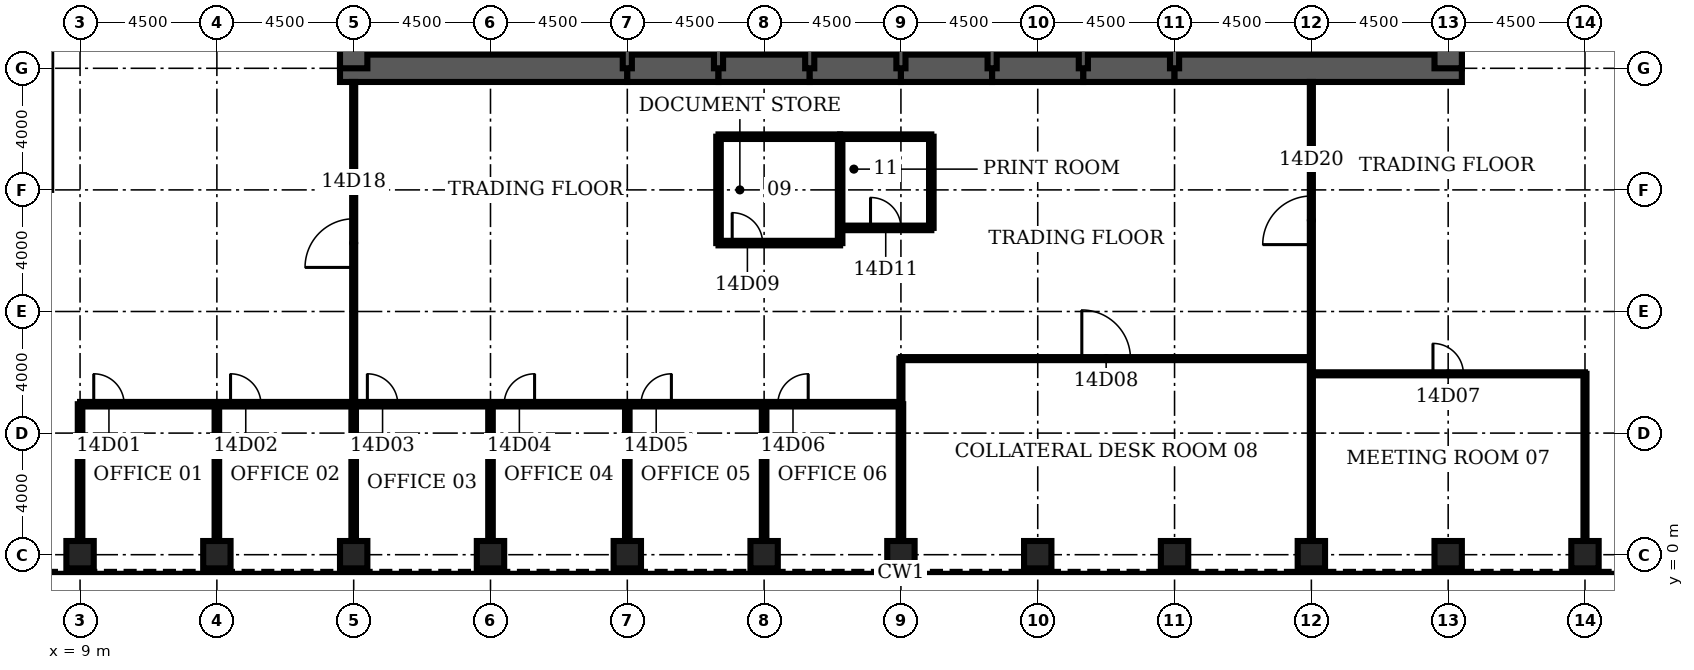
"""IFC4 building model, lengths in metres.
Left out: names, types, materials, properties, quantities, classifications, styles, units other than length and angle.
Written with IfcOpenShell. Run it as: python <this file> out.ifc"""

import sys

from ifc_helpers import new_model, si_unit, direction, frame, frame_2d, origin, origin_2d, place, context, subcontext, project, spatial, rectangle, hollow_rectangle, extrude, element, fill, save


model = new_model("IFC4")
c1 = context("Model", 3, precision=1e-05, world=origin(), true_north=direction((0.0, 1.0)))
c2 = subcontext(c1, "Body", "Model", "MODEL_VIEW")
j1 = project(units=[si_unit("LENGTHUNIT", "METRE"), si_unit("PLANEANGLEUNIT", "RADIAN")], contexts=[c1])
p1 = place(None, origin())
s1 = spatial("IfcSite", under=j1, at=p1, CompositionType="ELEMENT")
p2 = place(p1, origin())
s2 = spatial("IfcBuilding", under=s1, at=p2, CompositionType="ELEMENT")
p3 = place(p2, frame((0.0, 0.0, 68.0)))
s3 = spatial("IfcBuildingStorey", under=s2, at=p3, CompositionType="ELEMENT", Elevation=68.0)
for number, where, z_axis, x_axis in (
    (1, (9.0, 0.0, 0.0), (0.0, 0.0, 1.0), (0.0, 1.0, 0.0)),
    (2, (13.5, 0.0, 0.0), (0.0, 0.0, 1.0), (0.0, 1.0, 0.0)),
    (3, (18.0, 0.0, 0.0), (0.0, 0.0, 1.0), (0.0, 1.0, 0.0)),
    (4, (22.5, 0.0, 0.0), (0.0, 0.0, 1.0), (0.0, 1.0, 0.0)),
    (5, (27.0, 0.0, 0.0), (0.0, 0.0, 1.0), (0.0, 1.0, 0.0)),
    (6, (31.5, 0.0, 0.0), (0.0, 0.0, 1.0), (0.0, 1.0, 0.0)),
    (7, (36.0, 0.0, 0.0), (0.0, 0.0, 1.0), (0.0, 1.0, 0.0)),
    (8, (40.5, 0.0, 0.0), (0.0, 0.0, 1.0), (0.0, 1.0, 0.0)),
    (9, (45.0, 0.0, 0.0), (0.0, 0.0, 1.0), (0.0, 1.0, 0.0)),
    (10, (49.5, 0.0, 0.0), (0.0, 0.0, 1.0), (0.0, 1.0, 0.0)),
    (11, (54.0, 0.0, 0.0), (0.0, 0.0, 1.0), (0.0, 1.0, 0.0)),
    (12, (58.5, 0.0, 0.0), (0.0, 0.0, 1.0), (0.0, 1.0, 0.0)),
):
    element("IfcColumn", number, at=place(p3, frame(where, z_axis=z_axis, x_axis=x_axis)), inside=s3, PredefinedType="COLUMN", context=c2, shape_type="SweptSolid", body=[
        extrude(hollow_rectangle(XDim=0.9, YDim=0.9, WallThickness=0.12, at=origin_2d()), origin(), (0.0, 0.0, 1.0), 4.5),
    ])
p4 = place(p3, frame((17.55, 16.0, 0.0), z_axis=(0.0, 0.0, 1.0), x_axis=(1.0, 0.0, 0.0)))
e13 = element("IfcWall", 13, at=p4, inside=s3, PredefinedType="SHEAR", context=c2, shape_type="SweptSolid", body=[
    extrude(rectangle(XDim=9.45, YDim=0.9, at=frame_2d((4.725, 0.0))), origin(), (0.0, 0.0, 1.0), 4.5),
])
for number, where, z_axis, x_axis in (
    (14, (27.0, 16.0, 0.0), (0.0, 0.0, 1.0), (1.0, 0.0, 0.0)),
    (15, (30.0, 16.0, 0.0), (0.0, 0.0, 1.0), (1.0, 0.0, 0.0)),
    (16, (33.0, 16.0, 0.0), (0.0, 0.0, 1.0), (1.0, 0.0, 0.0)),
    (17, (36.0, 16.0, 0.0), (0.0, 0.0, 1.0), (1.0, 0.0, 0.0)),
    (18, (39.0, 16.0, 0.0), (0.0, 0.0, 1.0), (1.0, 0.0, 0.0)),
    (19, (42.0, 16.0, 0.0), (0.0, 0.0, 1.0), (1.0, 0.0, 0.0)),
):
    element("IfcWall", number, at=place(p3, frame(where, z_axis=z_axis, x_axis=x_axis)), inside=s3, PredefinedType="SHEAR", context=c2, shape_type="SweptSolid", body=[
        extrude(rectangle(XDim=3.0, YDim=0.9, at=frame_2d((1.5, 0.0))), origin(), (0.0, 0.0, 1.0), 4.5),
    ])
p5 = place(p3, frame((45.0, 16.0, 0.0), z_axis=(0.0, 0.0, 1.0), x_axis=(1.0, 0.0, 0.0)))
e20 = element("IfcWall", 20, at=p5, inside=s3, PredefinedType="SHEAR", context=c2, shape_type="SweptSolid", body=[
    extrude(rectangle(XDim=9.45, YDim=0.9, at=frame_2d((4.725, 0.0))), origin(), (0.0, 0.0, 1.0), 4.5),
])
for number, where, z_axis, x_axis in (
    (21, (18.0, 19.2, 0.0), (0.0, 0.0, 1.0), (0.0, -1.0, 0.0)),
    (22, (54.0, 16.0, 0.0), (0.0, 0.0, 1.0), (0.0, 1.0, 0.0)),
):
    element("IfcWall", number, at=place(p3, frame(where, z_axis=z_axis, x_axis=x_axis)), inside=s3, PredefinedType="SHEAR", context=c2, shape_type="SweptSolid", body=[
        extrude(rectangle(XDim=3.2, YDim=0.9, at=frame_2d((1.6, 0.0))), origin(), (0.0, 0.0, 1.0), 4.5),
    ])
for number, where, z_axis, x_axis in (
    (23, (27.0, 16.0, 0.0), (0.0, 0.0, 1.0), (0.0, 1.0, 0.0)),
    (24, (30.0, 16.0, 0.0), (0.0, 0.0, 1.0), (0.0, 1.0, 0.0)),
    (25, (33.0, 16.0, 0.0), (0.0, 0.0, 1.0), (0.0, 1.0, 0.0)),
    (26, (36.0, 16.0, 0.0), (0.0, 0.0, 1.0), (0.0, 1.0, 0.0)),
    (27, (39.0, 16.0, 0.0), (0.0, 0.0, 1.0), (0.0, 1.0, 0.0)),
    (28, (42.0, 16.0, 0.0), (0.0, 0.0, 1.0), (0.0, 1.0, 0.0)),
    (29, (45.0, 16.0, 0.0), (0.0, 0.0, 1.0), (0.0, 1.0, 0.0)),
):
    element("IfcWall", number, at=place(p3, frame(where, z_axis=z_axis, x_axis=x_axis)), inside=s3, PredefinedType="SOLIDWALL", context=c2, shape_type="SweptSolid", body=[
        extrude(rectangle(XDim=3.2, YDim=0.3, at=frame_2d((1.6, 0.0))), origin(), (0.0, 0.0, 1.0), 4.5),
    ])
p6 = place(p3, frame((9.0, 4.95, 0.0), z_axis=(0.0, 0.0, 1.0), x_axis=(1.0, 0.0, 0.0)))
e30 = element("IfcWall", 30, at=p6, inside=s3, PredefinedType="PARTITIONING", context=c2, shape_type="SweptSolid", body=[
    extrude(rectangle(XDim=27.0, YDim=0.15, at=frame_2d((13.5, 0.0))), origin(), (0.0, 0.0, 1.0), 3.0),
])
p7 = place(p6, frame((0.45, 0.0, 0.0)))
e31 = element("IfcOpeningElement", 31, at=p7, cuts=e30, PredefinedType="OPENING", context=c2, shape_type="SweptSolid", body=[
    extrude(rectangle(XDim=1.0, YDim=2.1, at=frame_2d((0.5, 1.05))), frame((0.0, 0.085, 0.0), z_axis=(0.0, -1.0, 0.0), x_axis=(1.0, 0.0, 0.0)), (0.0, 0.0, 1.0), 0.17),
])
p8 = place(p6, frame((4.95, 0.0, 0.0)))
e32 = element("IfcOpeningElement", 32, at=p8, cuts=e30, PredefinedType="OPENING", context=c2, shape_type="SweptSolid", body=[
    extrude(rectangle(XDim=1.0, YDim=2.1, at=frame_2d((0.5, 1.05))), frame((0.0, 0.085, 0.0), z_axis=(0.0, -1.0, 0.0), x_axis=(1.0, 0.0, 0.0)), (0.0, 0.0, 1.0), 0.17),
])
p9 = place(p6, frame((9.45, 0.0, 0.0)))
e33 = element("IfcOpeningElement", 33, at=p9, cuts=e30, PredefinedType="OPENING", context=c2, shape_type="SweptSolid", body=[
    extrude(rectangle(XDim=1.0, YDim=2.1, at=frame_2d((0.5, 1.05))), frame((0.0, 0.085, 0.0), z_axis=(0.0, -1.0, 0.0), x_axis=(1.0, 0.0, 0.0)), (0.0, 0.0, 1.0), 0.17),
])
p10 = place(p6, frame((13.95, 0.0, 0.0)))
e34 = element("IfcOpeningElement", 34, at=p10, cuts=e30, PredefinedType="OPENING", context=c2, shape_type="SweptSolid", body=[
    extrude(rectangle(XDim=1.0, YDim=2.1, at=frame_2d((0.5, 1.05))), frame((0.0, 0.085, 0.0), z_axis=(0.0, -1.0, 0.0), x_axis=(1.0, 0.0, 0.0)), (0.0, 0.0, 1.0), 0.17),
])
p11 = place(p6, frame((18.45, 0.0, 0.0)))
e35 = element("IfcOpeningElement", 35, at=p11, cuts=e30, PredefinedType="OPENING", context=c2, shape_type="SweptSolid", body=[
    extrude(rectangle(XDim=1.0, YDim=2.1, at=frame_2d((0.5, 1.05))), frame((0.0, 0.085, 0.0), z_axis=(0.0, -1.0, 0.0), x_axis=(1.0, 0.0, 0.0)), (0.0, 0.0, 1.0), 0.17),
])
p12 = place(p6, frame((22.95, 0.0, 0.0)))
e36 = element("IfcOpeningElement", 36, at=p12, cuts=e30, PredefinedType="OPENING", context=c2, shape_type="SweptSolid", body=[
    extrude(rectangle(XDim=1.0, YDim=2.1, at=frame_2d((0.5, 1.05))), frame((0.0, 0.085, 0.0), z_axis=(0.0, -1.0, 0.0), x_axis=(1.0, 0.0, 0.0)), (0.0, 0.0, 1.0), 0.17),
])
p13 = place(p3, frame((49.5, 5.95, 0.0), z_axis=(0.0, 0.0, 1.0), x_axis=(1.0, 0.0, 0.0)))
e37 = element("IfcWall", 37, at=p13, inside=s3, PredefinedType="PARTITIONING", context=c2, shape_type="SweptSolid", body=[
    extrude(rectangle(XDim=9.0, YDim=0.1, at=frame_2d((4.5, 0.0))), origin(), (0.0, 0.0, 1.0), 3.0),
])
p14 = place(p13, frame((4.0, 0.0, 0.0)))
e38 = element("IfcOpeningElement", 38, at=p14, cuts=e37, PredefinedType="OPENING", context=c2, shape_type="SweptSolid", body=[
    extrude(rectangle(XDim=1.0, YDim=2.1, at=frame_2d((0.5, 1.05))), frame((0.0, 0.06, 0.0), z_axis=(0.0, -1.0, 0.0), x_axis=(1.0, 0.0, 0.0)), (0.0, 0.0, 1.0), 0.12),
])
p15 = place(p3, frame((36.0, 6.45, 0.0), z_axis=(0.0, 0.0, 1.0), x_axis=(1.0, 0.0, 0.0)))
e39 = element("IfcWall", 39, at=p15, inside=s3, PredefinedType="PARTITIONING", context=c2, shape_type="SweptSolid", body=[
    extrude(rectangle(XDim=13.5, YDim=0.1, at=frame_2d((6.75, 0.0))), origin(), (0.0, 0.0, 1.0), 3.0),
])
p16 = place(p15, frame((5.95, 0.0, 0.0)))
e40 = element("IfcOpeningElement", 40, at=p16, cuts=e39, PredefinedType="OPENING", context=c2, shape_type="SweptSolid", body=[
    extrude(rectangle(XDim=1.6, YDim=2.1, at=frame_2d((0.8, 1.05))), frame((0.0, 0.06, 0.0), z_axis=(0.0, -1.0, 0.0), x_axis=(1.0, 0.0, 0.0)), (0.0, 0.0, 1.0), 0.12),
])
p17 = place(p3, frame((30.0, 10.25, 0.0), z_axis=(0.0, 0.0, 1.0), x_axis=(1.0, 0.0, 0.0)))
e41 = element("IfcWall", 41, at=p17, inside=s3, PredefinedType="PARTITIONING", context=c2, shape_type="SweptSolid", body=[
    extrude(rectangle(XDim=4.0, YDim=0.15, at=frame_2d((2.0, 0.0))), origin(), (0.0, 0.0, 1.0), 3.0),
])
p18 = place(p17, frame((0.45, 0.0, 0.0)))
e42 = element("IfcOpeningElement", 42, at=p18, cuts=e41, PredefinedType="OPENING", context=c2, shape_type="SweptSolid", body=[
    extrude(rectangle(XDim=1.0, YDim=2.1, at=frame_2d((0.5, 1.05))), frame((0.0, 0.085, 0.0), z_axis=(0.0, -1.0, 0.0), x_axis=(1.0, 0.0, 0.0)), (0.0, 0.0, 1.0), 0.17),
])
p19 = place(p3, frame((34.0, 10.75, 0.0), z_axis=(0.0, 0.0, 1.0), x_axis=(1.0, 0.0, 0.0)))
e43 = element("IfcWall", 43, at=p19, inside=s3, PredefinedType="PARTITIONING", context=c2, shape_type="SweptSolid", body=[
    extrude(rectangle(XDim=3.0, YDim=0.15, at=frame_2d((1.5, 0.0))), origin(), (0.0, 0.0, 1.0), 3.0),
])
p20 = place(p19, frame((1.0, 0.0, 0.0)))
e44 = element("IfcOpeningElement", 44, at=p20, cuts=e43, PredefinedType="OPENING", context=c2, shape_type="SweptSolid", body=[
    extrude(rectangle(XDim=1.0, YDim=2.1, at=frame_2d((0.5, 1.05))), frame((0.0, 0.085, 0.0), z_axis=(0.0, -1.0, 0.0), x_axis=(1.0, 0.0, 0.0)), (0.0, 0.0, 1.0), 0.17),
])
p21 = place(p3, frame((30.0, 13.75, 0.0), z_axis=(0.0, 0.0, 1.0), x_axis=(1.0, 0.0, 0.0)))
e45 = element("IfcWall", 45, at=p21, inside=s3, PredefinedType="PARTITIONING", context=c2, shape_type="SweptSolid", body=[
    extrude(rectangle(XDim=4.0, YDim=0.15, at=frame_2d((2.0, 0.0))), origin(), (0.0, 0.0, 1.0), 3.0),
])
p22 = place(p3, frame((34.0, 13.75, 0.0), z_axis=(0.0, 0.0, 1.0), x_axis=(1.0, 0.0, 0.0)))
e46 = element("IfcWall", 46, at=p22, inside=s3, PredefinedType="PARTITIONING", context=c2, shape_type="SweptSolid", body=[
    extrude(rectangle(XDim=3.0, YDim=0.15, at=frame_2d((1.5, 0.0))), origin(), (0.0, 0.0, 1.0), 3.0),
])
for number, where, z_axis, x_axis in (
    (47, (9.0, 0.45, 0.0), (0.0, 0.0, 1.0), (0.0, 1.0, 0.0)),
    (48, (13.5, 0.45, 0.0), (0.0, 0.0, 1.0), (0.0, 1.0, 0.0)),
    (49, (18.0, 0.45, 0.0), (0.0, 0.0, 1.0), (0.0, 1.0, 0.0)),
):
    element("IfcWall", number, at=place(p3, frame(where, z_axis=z_axis, x_axis=x_axis)), inside=s3, PredefinedType="PARTITIONING", context=c2, shape_type="SweptSolid", body=[
        extrude(rectangle(XDim=4.5, YDim=0.15, at=frame_2d((2.25, 0.0))), origin(), (0.0, 0.0, 1.0), 3.0),
    ])
p23 = place(p3, frame((18.0, 4.95, 0.0), z_axis=(0.0, 0.0, 1.0), x_axis=(0.0, 1.0, 0.0)))
e50 = element("IfcWall", 50, at=p23, inside=s3, PredefinedType="PARTITIONING", context=c2, shape_type="SweptSolid", body=[
    extrude(rectangle(XDim=10.6, YDim=0.1, at=frame_2d((5.3, 0.0))), origin(), (0.0, 0.0, 1.0), 3.0),
])
p24 = place(p23, frame((4.5, 0.0, 0.0)))
e51 = element("IfcOpeningElement", 51, at=p24, cuts=e50, PredefinedType="OPENING", context=c2, shape_type="SweptSolid", body=[
    extrude(rectangle(XDim=1.6, YDim=2.1, at=frame_2d((0.8, 1.05))), frame((0.0, 0.06, 0.0), z_axis=(0.0, -1.0, 0.0), x_axis=(1.0, 0.0, 0.0)), (0.0, 0.0, 1.0), 0.12),
])
for number, where, z_axis, x_axis in (
    (52, (22.5, 0.45, 0.0), (0.0, 0.0, 1.0), (0.0, 1.0, 0.0)),
    (53, (27.0, 0.45, 0.0), (0.0, 0.0, 1.0), (0.0, 1.0, 0.0)),
):
    element("IfcWall", number, at=place(p3, frame(where, z_axis=z_axis, x_axis=x_axis)), inside=s3, PredefinedType="PARTITIONING", context=c2, shape_type="SweptSolid", body=[
        extrude(rectangle(XDim=4.5, YDim=0.15, at=frame_2d((2.25, 0.0))), origin(), (0.0, 0.0, 1.0), 3.0),
    ])
p25 = place(p3, frame((30.0, 10.25, 0.0), z_axis=(0.0, 0.0, 1.0), x_axis=(0.0, 1.0, 0.0)))
e54 = element("IfcWall", 54, at=p25, inside=s3, PredefinedType="PARTITIONING", context=c2, shape_type="SweptSolid", body=[
    extrude(rectangle(XDim=3.5, YDim=0.15, at=frame_2d((1.75, 0.0))), origin(), (0.0, 0.0, 1.0), 3.0),
])
p26 = place(p3, frame((31.5, 0.45, 0.0), z_axis=(0.0, 0.0, 1.0), x_axis=(0.0, 1.0, 0.0)))
e55 = element("IfcWall", 55, at=p26, inside=s3, PredefinedType="PARTITIONING", context=c2, shape_type="SweptSolid", body=[
    extrude(rectangle(XDim=4.5, YDim=0.15, at=frame_2d((2.25, 0.0))), origin(), (0.0, 0.0, 1.0), 3.0),
])
p27 = place(p3, frame((34.0, 10.25, 0.0), z_axis=(0.0, 0.0, 1.0), x_axis=(0.0, 1.0, 0.0)))
e56 = element("IfcWall", 56, at=p27, inside=s3, PredefinedType="PARTITIONING", context=c2, shape_type="SweptSolid", body=[
    extrude(rectangle(XDim=3.5, YDim=0.15, at=frame_2d((1.75, 0.0))), origin(), (0.0, 0.0, 1.0), 3.0),
])
p28 = place(p3, frame((36.0, 0.45, 0.0), z_axis=(0.0, 0.0, 1.0), x_axis=(0.0, 1.0, 0.0)))
e57 = element("IfcWall", 57, at=p28, inside=s3, PredefinedType="PARTITIONING", context=c2, shape_type="SweptSolid", body=[
    extrude(rectangle(XDim=4.5, YDim=0.15, at=frame_2d((2.25, 0.0))), origin(), (0.0, 0.0, 1.0), 3.0),
])
p29 = place(p3, frame((36.0, 4.95, 0.0), z_axis=(0.0, 0.0, 1.0), x_axis=(0.0, 1.0, 0.0)))
e58 = element("IfcWall", 58, at=p29, inside=s3, PredefinedType="PARTITIONING", context=c2, shape_type="SweptSolid", body=[
    extrude(rectangle(XDim=1.5, YDim=0.1, at=frame_2d((0.75, 0.0))), origin(), (0.0, 0.0, 1.0), 3.0),
])
p30 = place(p3, frame((37.0, 10.75, 0.0), z_axis=(0.0, 0.0, 1.0), x_axis=(0.0, 1.0, 0.0)))
e59 = element("IfcWall", 59, at=p30, inside=s3, PredefinedType="PARTITIONING", context=c2, shape_type="SweptSolid", body=[
    extrude(rectangle(XDim=3.0, YDim=0.15, at=frame_2d((1.5, 0.0))), origin(), (0.0, 0.0, 1.0), 3.0),
])
p31 = place(p3, frame((49.5, 0.45, 0.0), z_axis=(0.0, 0.0, 1.0), x_axis=(0.0, 1.0, 0.0)))
e60 = element("IfcWall", 60, at=p31, inside=s3, PredefinedType="PARTITIONING", context=c2, shape_type="SweptSolid", body=[
    extrude(rectangle(XDim=15.1, YDim=0.1, at=frame_2d((7.55, 0.0))), origin(), (0.0, 0.0, 1.0), 3.0),
])
p32 = place(p31, frame((9.75, 0.0, 0.0)))
e61 = element("IfcOpeningElement", 61, at=p32, cuts=e60, PredefinedType="OPENING", context=c2, shape_type="SweptSolid", body=[
    extrude(rectangle(XDim=1.6, YDim=2.1, at=frame_2d((0.8, 1.05))), frame((0.0, 0.06, 0.0), z_axis=(0.0, -1.0, 0.0), x_axis=(1.0, 0.0, 0.0)), (0.0, 0.0, 1.0), 0.12),
])
p33 = place(p3, frame((58.5, 0.45, 0.0), z_axis=(0.0, 0.0, 1.0), x_axis=(0.0, 1.0, 0.0)))
e62 = element("IfcWall", 62, at=p33, inside=s3, PredefinedType="PARTITIONING", context=c2, shape_type="SweptSolid", body=[
    extrude(rectangle(XDim=5.5, YDim=0.1, at=frame_2d((2.75, 0.0))), origin(), (0.0, 0.0, 1.0), 3.0),
])
p34 = place(p7, origin())
e63 = element("IfcDoor", 63, at=p34, inside=s3, OperationType="SINGLE_SWING_LEFT", PredefinedType="DOOR", context=c2, shape_type="SweptSolid", body=[
    extrude(rectangle(XDim=1.0, YDim=2.1, at=frame_2d((0.5, 1.05))), frame((0.0, 0.025, 0.0), z_axis=(0.0, -1.0, 0.0), x_axis=(1.0, 0.0, 0.0)), (0.0, 0.0, 1.0), 0.05),
])
fill(e31, e63)
p35 = place(p8, origin())
e64 = element("IfcDoor", 64, at=p35, inside=s3, OperationType="SINGLE_SWING_LEFT", PredefinedType="DOOR", context=c2, shape_type="SweptSolid", body=[
    extrude(rectangle(XDim=1.0, YDim=2.1, at=frame_2d((0.5, 1.05))), frame((0.0, 0.025, 0.0), z_axis=(0.0, -1.0, 0.0), x_axis=(1.0, 0.0, 0.0)), (0.0, 0.0, 1.0), 0.05),
])
fill(e32, e64)
p36 = place(p9, origin())
e65 = element("IfcDoor", 65, at=p36, inside=s3, OperationType="SINGLE_SWING_LEFT", PredefinedType="DOOR", context=c2, shape_type="SweptSolid", body=[
    extrude(rectangle(XDim=1.0, YDim=2.1, at=frame_2d((0.5, 1.05))), frame((0.0, 0.025, 0.0), z_axis=(0.0, -1.0, 0.0), x_axis=(1.0, 0.0, 0.0)), (0.0, 0.0, 1.0), 0.05),
])
fill(e33, e65)
p37 = place(p10, origin())
e66 = element("IfcDoor", 66, at=p37, inside=s3, OperationType="SINGLE_SWING_RIGHT", PredefinedType="DOOR", context=c2, shape_type="SweptSolid", body=[
    extrude(rectangle(XDim=1.0, YDim=2.1, at=frame_2d((0.5, 1.05))), frame((0.0, 0.025, 0.0), z_axis=(0.0, -1.0, 0.0), x_axis=(1.0, 0.0, 0.0)), (0.0, 0.0, 1.0), 0.05),
])
fill(e34, e66)
p38 = place(p11, origin())
e67 = element("IfcDoor", 67, at=p38, inside=s3, OperationType="SINGLE_SWING_RIGHT", PredefinedType="DOOR", context=c2, shape_type="SweptSolid", body=[
    extrude(rectangle(XDim=1.0, YDim=2.1, at=frame_2d((0.5, 1.05))), frame((0.0, 0.025, 0.0), z_axis=(0.0, -1.0, 0.0), x_axis=(1.0, 0.0, 0.0)), (0.0, 0.0, 1.0), 0.05),
])
fill(e35, e67)
p39 = place(p12, origin())
e68 = element("IfcDoor", 68, at=p39, inside=s3, OperationType="SINGLE_SWING_RIGHT", PredefinedType="DOOR", context=c2, shape_type="SweptSolid", body=[
    extrude(rectangle(XDim=1.0, YDim=2.1, at=frame_2d((0.5, 1.05))), frame((0.0, 0.025, 0.0), z_axis=(0.0, -1.0, 0.0), x_axis=(1.0, 0.0, 0.0)), (0.0, 0.0, 1.0), 0.05),
])
fill(e36, e68)
p40 = place(p14, origin())
e69 = element("IfcDoor", 69, at=p40, inside=s3, OperationType="SINGLE_SWING_LEFT", PredefinedType="DOOR", context=c2, shape_type="SweptSolid", body=[
    extrude(rectangle(XDim=1.0, YDim=2.1, at=frame_2d((0.5, 1.05))), frame((0.0, 0.025, 0.0), z_axis=(0.0, -1.0, 0.0), x_axis=(1.0, 0.0, 0.0)), (0.0, 0.0, 1.0), 0.05),
])
fill(e38, e69)
p41 = place(p16, origin())
e70 = element("IfcDoor", 70, at=p41, inside=s3, OperationType="SINGLE_SWING_LEFT", PredefinedType="DOOR", context=c2, shape_type="SweptSolid", body=[
    extrude(rectangle(XDim=1.6, YDim=2.1, at=frame_2d((0.8, 1.05))), frame((0.0, 0.025, 0.0), z_axis=(0.0, -1.0, 0.0), x_axis=(1.0, 0.0, 0.0)), (0.0, 0.0, 1.0), 0.05),
])
fill(e40, e70)
p42 = place(p18, origin())
e71 = element("IfcDoor", 71, at=p42, inside=s3, OperationType="SINGLE_SWING_LEFT", PredefinedType="DOOR", context=c2, shape_type="SweptSolid", body=[
    extrude(rectangle(XDim=1.0, YDim=2.1, at=frame_2d((0.5, 1.05))), frame((0.0, 0.025, 0.0), z_axis=(0.0, -1.0, 0.0), x_axis=(1.0, 0.0, 0.0)), (0.0, 0.0, 1.0), 0.05),
])
fill(e42, e71)
p43 = place(p20, origin())
e72 = element("IfcDoor", 72, at=p43, inside=s3, OperationType="SINGLE_SWING_LEFT", PredefinedType="DOOR", context=c2, shape_type="SweptSolid", body=[
    extrude(rectangle(XDim=1.0, YDim=2.1, at=frame_2d((0.5, 1.05))), frame((0.0, 0.025, 0.0), z_axis=(0.0, -1.0, 0.0), x_axis=(1.0, 0.0, 0.0)), (0.0, 0.0, 1.0), 0.05),
])
fill(e44, e72)
p44 = place(p24, origin())
e73 = element("IfcDoor", 73, at=p44, inside=s3, OperationType="SINGLE_SWING_LEFT", PredefinedType="DOOR", context=c2, shape_type="SweptSolid", body=[
    extrude(rectangle(XDim=1.6, YDim=2.1, at=frame_2d((0.8, 1.05))), frame((0.0, 0.025, 0.0), z_axis=(0.0, -1.0, 0.0), x_axis=(1.0, 0.0, 0.0)), (0.0, 0.0, 1.0), 0.05),
])
fill(e51, e73)
p45 = place(p32, origin())
e74 = element("IfcDoor", 74, at=p45, inside=s3, OperationType="SINGLE_SWING_LEFT", PredefinedType="DOOR", context=c2, shape_type="SweptSolid", body=[
    extrude(rectangle(XDim=1.6, YDim=2.1, at=frame_2d((0.8, 1.05))), frame((0.0, 0.025, 0.0), z_axis=(0.0, -1.0, 0.0), x_axis=(1.0, 0.0, 0.0)), (0.0, 0.0, 1.0), 0.05),
])
fill(e61, e74)
save(model, sys.argv[1])
